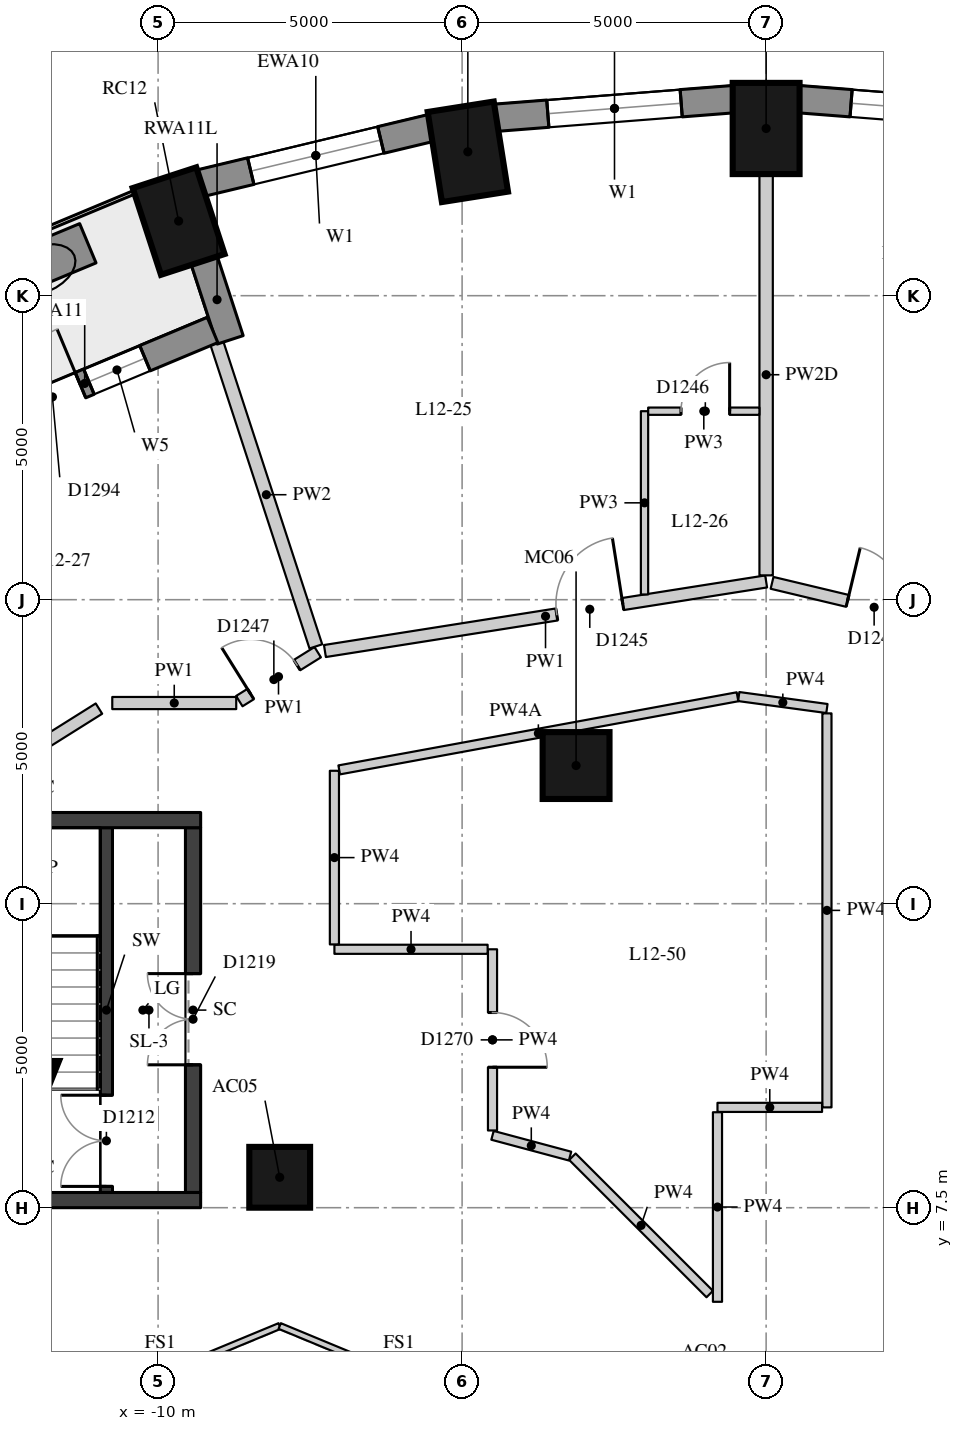
"""IFC4 building model, lengths in metres.
Left out: names, types, materials, properties, quantities, classifications, styles, units other than length and angle.
Written with IfcOpenShell. Run it as: python <this file> out.ifc"""

import sys

from ifc_helpers import new_model, si_unit, direction, frame, frame_2d, origin, origin_2d, place, context, subcontext, project, spatial, rectangle, extrude, element, fill, save


model = new_model("IFC4")
c1 = context("Model", 3, precision=1e-05, world=origin(), true_north=direction((0.0, 1.0)))
c2 = subcontext(c1, "Body", "Model", "MODEL_VIEW")
j1 = project(units=[si_unit("LENGTHUNIT", "METRE"), si_unit("PLANEANGLEUNIT", "RADIAN")], contexts=[c1])
p1 = place(None, origin())
s1 = spatial("IfcSite", under=j1, at=p1, CompositionType="ELEMENT")
p2 = place(p1, origin())
s2 = spatial("IfcBuilding", under=s1, at=p2, CompositionType="ELEMENT")
p3 = place(p2, frame((0.0, 0.0, 48.1)))
s3 = spatial("IfcBuildingStorey", under=s2, at=p3, CompositionType="ELEMENT", Elevation=48.1)
for number, where, z_axis, x_axis in (
    (1, (0.0, 25.25, 0.0), (0.0, 0.0, 1.0), (0.0, 1.0, 0.0)),
    (2, (-4.906, 24.866, 0.0), (0.0, 0.0, 1.0), (-0.156, 0.988, 0.0)),
    (3, (-9.662, 23.727, 0.0), (0.0, 0.0, 1.0), (-0.31, 0.951, 0.0)),
):
    element("IfcColumn", number, at=place(p3, frame(where, z_axis=z_axis, x_axis=x_axis)), inside=s3, PredefinedType="COLUMN", context=c2, shape_type="SweptSolid", body=[
        extrude(rectangle(XDim=1.5, YDim=1.1, at=origin_2d()), origin(), (0.0, 0.0, 1.0), 3.3),
    ])
p4 = place(p3, frame((-8.0, 8.0, 0.0), z_axis=(0.0, 0.0, 1.0), x_axis=(1.0, 0.0, 0.0)))
e4 = element("IfcColumn", 4, at=p4, inside=s3, PredefinedType="COLUMN", context=c2, shape_type="SweptSolid", body=[
    extrude(rectangle(XDim=1.0, YDim=1.0, at=origin_2d()), origin(), (0.0, 0.0, 1.0), 3.3),
])
p5 = place(p3, frame((-3.126, 14.772, 0.0), z_axis=(0.0, 0.0, 1.0), x_axis=(1.0, 0.0, 0.0)))
e5 = element("IfcColumn", 5, at=p5, inside=s3, PredefinedType="COLUMN", context=c2, shape_type="SweptSolid", body=[
    extrude(rectangle(XDim=1.1, YDim=1.1, at=origin_2d()), origin(), (0.0, 0.0, 1.0), 3.3),
])
p6 = place(p3, frame((4.457, 25.426, 0.0), z_axis=(0.0, 0.0, 1.0), x_axis=(-0.996955972145, 0.077966592873, 0.0)))
e6 = element("IfcWall", 6, at=p6, inside=s3, PredefinedType="SOLIDWALL", context=c2, shape_type="SweptSolid", body=[
    extrude(rectangle(XDim=3.939, YDim=0.45, at=frame_2d((1.97, 0.0))), origin(), (0.0, 0.0, 1.0), 3.02),
])
p7 = place(p6, frame((0.87, 0.0, 0.4)))
e7 = element("IfcOpeningElement", 7, at=p7, cuts=e6, PredefinedType="OPENING", context=c2, shape_type="SweptSolid", body=[
    extrude(rectangle(XDim=2.2, YDim=1.75, at=frame_2d((1.1, 0.875))), frame((0.0, 0.235, 0.0), z_axis=(0.0, -1.0, 0.0), x_axis=(1.0, 0.0, 0.0)), (0.0, 0.0, 1.0), 0.47),
])
p8 = place(p3, frame((-0.53, 25.733, 0.0), z_axis=(0.0, 0.0, 1.0), x_axis=(-0.996955972145, -0.077966592873, 0.0)))
e8 = element("IfcWall", 8, at=p8, inside=s3, PredefinedType="SOLIDWALL", context=c2, shape_type="SweptSolid", body=[
    extrude(rectangle(XDim=3.939, YDim=0.45, at=frame_2d((1.97, 0.0))), origin(), (0.0, 0.0, 1.0), 3.02),
])
p9 = place(p8, frame((0.87, 0.0, 0.4)))
e9 = element("IfcOpeningElement", 9, at=p9, cuts=e8, PredefinedType="OPENING", context=c2, shape_type="SweptSolid", body=[
    extrude(rectangle(XDim=2.2, YDim=1.75, at=frame_2d((1.1, 0.875))), frame((0.0, 0.235, 0.0), z_axis=(0.0, -1.0, 0.0), x_axis=(1.0, 0.0, 0.0)), (0.0, 0.0, 1.0), 0.47),
])
p10 = place(p3, frame((-5.504, 25.26, 0.0), z_axis=(0.0, 0.0, 1.0), x_axis=(-0.972496561493, -0.232917233979, 0.0)))
e10 = element("IfcWall", 10, at=p10, inside=s3, PredefinedType="SOLIDWALL", context=c2, shape_type="SweptSolid", body=[
    extrude(rectangle(XDim=3.911, YDim=0.45, at=frame_2d((1.956, 0.0))), origin(), (0.0, 0.0, 1.0), 3.02),
])
p11 = place(p10, frame((0.855, 0.0, 0.4)))
e11 = element("IfcOpeningElement", 11, at=p11, cuts=e10, PredefinedType="OPENING", context=c2, shape_type="SweptSolid", body=[
    extrude(rectangle(XDim=2.2, YDim=1.75, at=frame_2d((1.1, 0.875))), frame((0.0, 0.235, 0.0), z_axis=(0.0, -1.0, 0.0), x_axis=(1.0, 0.0, 0.0)), (0.0, 0.0, 1.0), 0.47),
])
p12 = place(p3, frame((-9.246, 23.095, 0.0), z_axis=(0.0, 0.0, 1.0), x_axis=(0.310110311429, -0.950700581017, 0.0)))
e12 = element("IfcWall", 12, at=p12, inside=s3, PredefinedType="SOLIDWALL", context=c2, shape_type="SweptSolid", body=[
    extrude(rectangle(XDim=1.39, YDim=0.45, at=frame_2d((0.695, 0.0))), origin(), (0.0, 0.0, 1.0), 3.02),
])
p13 = place(p3, frame((-9.104, 21.936, 0.0), z_axis=(0.0, 0.0, 1.0), x_axis=(-0.922645368502, -0.385649483317, 0.0)))
e13 = element("IfcWall", 13, at=p13, inside=s3, PredefinedType="SOLIDWALL", context=c2, shape_type="SweptSolid", body=[
    extrude(rectangle(XDim=4.559, YDim=0.45, at=frame_2d((2.279, 0.0))), origin(), (0.0, 0.0, 1.0), 3.02),
])
p14 = place(p13, frame((1.204, 0.0, 0.4)))
e14 = element("IfcOpeningElement", 14, at=p14, cuts=e13, PredefinedType="OPENING", context=c2, shape_type="SweptSolid", body=[
    extrude(rectangle(XDim=1.0, YDim=1.75, at=frame_2d((0.5, 0.875))), frame((0.0, 0.235, 0.0), z_axis=(0.0, -1.0, 0.0), x_axis=(1.0, 0.0, 0.0)), (0.0, 0.0, 1.0), 0.47),
])
p15 = place(p13, frame((2.354, 0.0, 0.0)))
e15 = element("IfcOpeningElement", 15, at=p15, cuts=e13, PredefinedType="OPENING", context=c2, shape_type="SweptSolid", body=[
    extrude(rectangle(XDim=1.0, YDim=2.15, at=frame_2d((0.5, 1.075))), frame((0.0, 0.235, 0.0), z_axis=(0.0, -1.0, 0.0), x_axis=(1.0, 0.0, 0.0)), (0.0, 0.0, 1.0), 0.47),
])
p16 = place(p3, frame((-11.155, 23.362, 0.0), z_axis=(0.0, 0.0, 1.0), x_axis=(-0.923000660042, -0.384798364811, 0.0)))
e16 = element("IfcWall", 16, at=p16, inside=s3, PredefinedType="USERDEFINED", context=c2, shape_type="SweptSolid", body=[
    extrude(rectangle(XDim=1.8, YDim=0.7, at=frame_2d((0.9, 0.0))), origin(), (0.0, 0.0, 1.0), 0.75),
])
p17 = place(p3, frame((-10.85, 7.75, 0.0), z_axis=(0.0, 0.0, 1.0), x_axis=(0.0, 1.0, 0.0)))
e17 = element("IfcWall", 17, at=p17, inside=s3, PredefinedType="SHEAR", context=c2, shape_type="SweptSolid", body=[
    extrude(rectangle(XDim=6.0, YDim=0.2, at=frame_2d((3.0, 0.0))), origin(), (0.0, 0.0, 1.0), 3.02),
])
p18 = place(p17, frame((0.1, 0.0, 0.0)))
e18 = element("IfcOpeningElement", 18, at=p18, cuts=e17, PredefinedType="OPENING", context=c2, shape_type="SweptSolid", body=[
    extrude(rectangle(XDim=1.5, YDim=2.1, at=frame_2d((0.75, 1.05))), frame((0.0, 0.11, 0.0), z_axis=(0.0, -1.0, 0.0), x_axis=(1.0, 0.0, 0.0)), (0.0, 0.0, 1.0), 0.22),
])
p19 = place(p3, frame((-9.425, 7.75, -0.28), z_axis=(0.0, 0.0, 1.0), x_axis=(0.0, 1.0, 0.0)))
e19 = element("IfcWall", 19, at=p19, inside=s3, PredefinedType="SHEAR", context=c2, shape_type="SweptSolid", body=[
    extrude(rectangle(XDim=6.0, YDim=0.25, at=frame_2d((3.0, 0.0))), origin(), (0.0, 0.0, 1.0), 3.3),
])
p20 = place(p19, frame((2.1, 0.0, 0.28)))
e20 = element("IfcOpeningElement", 20, at=p20, cuts=e19, PredefinedType="OPENING", context=c2, shape_type="SweptSolid", body=[
    extrude(rectangle(XDim=1.5, YDim=2.1, at=frame_2d((0.75, 1.05))), frame((0.0, 0.135, 0.0), z_axis=(0.0, -1.0, 0.0), x_axis=(1.0, 0.0, 0.0)), (0.0, 0.0, 1.0), 0.27),
])
for number, where, z_axis, x_axis in (
    (21, (-14.5, 13.875, -0.28), (0.0, 0.0, 1.0), (1.0, 0.0, 0.0)),
    (22, (-14.5, 7.625, -0.28), (0.0, 0.0, 1.0), (1.0, 0.0, 0.0)),
):
    element("IfcWall", number, at=place(p3, frame(where, z_axis=z_axis, x_axis=x_axis)), inside=s3, PredefinedType="SHEAR", context=c2, shape_type="SweptSolid", body=[
        extrude(rectangle(XDim=5.2, YDim=0.25, at=frame_2d((2.6, 0.0))), origin(), (0.0, 0.0, 1.0), 3.3),
    ])
p21 = place(p3, frame((-13.571, 14.077, 0.0), z_axis=(0.0, 0.0, 1.0), x_axis=(0.846954991261, 0.53166459613, 0.0)))
e23 = element("IfcWall", 23, at=p21, inside=s3, PredefinedType="PARTITIONING", context=c2, shape_type="SweptSolid", body=[
    extrude(rectangle(XDim=3.068, YDim=0.2, at=frame_2d((1.534, 0.0))), origin(), (0.0, 0.0, 1.0), 3.02),
])
p22 = place(p3, frame((-10.753, 15.8, 0.0), z_axis=(0.0, 0.0, 1.0), x_axis=(1.0, 0.0, 0.0)))
e24 = element("IfcWall", 24, at=p22, inside=s3, PredefinedType="PARTITIONING", context=c2, shape_type="SweptSolid", body=[
    extrude(rectangle(XDim=2.039, YDim=0.2, at=frame_2d((1.019, 0.0))), origin(), (0.0, 0.0, 1.0), 3.02),
])
p23 = place(p3, frame((-8.664, 15.832, 0.0), z_axis=(0.0, 0.0, 1.0), x_axis=(0.848304931689, 0.529508019648, 0.0)))
e25 = element("IfcWall", 25, at=p23, inside=s3, PredefinedType="PARTITIONING", context=c2, shape_type="SweptSolid", body=[
    extrude(rectangle(XDim=1.52, YDim=0.2, at=frame_2d((0.76, 0.0))), origin(), (0.0, 0.0, 1.0), 3.02),
])
p24 = place(p23, frame((0.22, 0.0, 0.0)))
e26 = element("IfcOpeningElement", 26, at=p24, cuts=e25, PredefinedType="OPENING", context=c2, shape_type="SweptSolid", body=[
    extrude(rectangle(XDim=0.9, YDim=2.1, at=frame_2d((0.45, 1.05))), frame((0.0, 0.11, 0.0), z_axis=(0.0, -1.0, 0.0), x_axis=(1.0, 0.0, 0.0)), (0.0, 0.0, 1.0), 0.22),
])
p25 = place(p3, frame((-7.256, 16.656, 0.0), z_axis=(0.0, 0.0, 1.0), x_axis=(0.987787475409, 0.15580726371, 0.0)))
e27 = element("IfcWall", 27, at=p25, inside=s3, PredefinedType="PARTITIONING", context=c2, shape_type="SweptSolid", body=[
    extrude(rectangle(XDim=7.346, YDim=0.2, at=frame_2d((3.673, 0.0))), origin(), (0.0, 0.0, 1.0), 3.02),
])
p26 = place(p25, frame((3.86, 0.0, 0.0)))
e28 = element("IfcOpeningElement", 28, at=p26, cuts=e27, PredefinedType="OPENING", context=c2, shape_type="SweptSolid", body=[
    extrude(rectangle(XDim=1.1, YDim=2.1, at=frame_2d((0.55, 1.05))), frame((0.0, 0.11, 0.0), z_axis=(0.0, -1.0, 0.0), x_axis=(1.0, 0.0, 0.0)), (0.0, 0.0, 1.0), 0.22),
])
p27 = place(p3, frame((0.098, 17.777, 0.0), z_axis=(0.0, 0.0, 1.0), x_axis=(0.97258196627, -0.232560355362, 0.0)))
e29 = element("IfcWall", 29, at=p27, inside=s3, PredefinedType="PARTITIONING", context=c2, shape_type="SweptSolid", body=[
    extrude(rectangle(XDim=10.933, YDim=0.2, at=frame_2d((5.466, 0.0))), origin(), (0.0, 0.0, 1.0), 3.02),
])
p28 = place(p27, frame((9.613, 0.0, 0.0)))
e30 = element("IfcOpeningElement", 30, at=p28, cuts=e29, PredefinedType="OPENING", context=c2, shape_type="SweptSolid", body=[
    extrude(rectangle(XDim=1.1, YDim=2.1, at=frame_2d((0.55, 1.05))), frame((0.0, 0.11, 0.0), z_axis=(0.0, -1.0, 0.0), x_axis=(1.0, 0.0, 0.0)), (0.0, 0.0, 1.0), 0.22),
])
p29 = place(p27, frame((4.325, 0.0, 0.0)))
e31 = element("IfcOpeningElement", 31, at=p29, cuts=e29, PredefinedType="OPENING", context=c2, shape_type="SweptSolid", body=[
    extrude(rectangle(XDim=1.0, YDim=2.1, at=frame_2d((0.5, 1.05))), frame((0.0, 0.11, 0.0), z_axis=(0.0, -1.0, 0.0), x_axis=(1.0, 0.0, 0.0)), (0.0, 0.0, 1.0), 0.22),
])
p30 = place(p27, frame((1.276, 0.0, 0.0)))
e32 = element("IfcOpeningElement", 32, at=p30, cuts=e29, PredefinedType="OPENING", context=c2, shape_type="SweptSolid", body=[
    extrude(rectangle(XDim=0.9, YDim=2.1, at=frame_2d((0.45, 1.05))), frame((0.0, 0.11, 0.0), z_axis=(0.0, -1.0, 0.0), x_axis=(1.0, 0.0, 0.0)), (0.0, 0.0, 1.0), 0.22),
])
p31 = place(p3, frame((-0.451, 15.907, 0.0), z_axis=(0.0, 0.0, 1.0), x_axis=(0.99094751199, -0.134249873301, 0.0)))
e33 = element("IfcWall", 33, at=p31, inside=s3, PredefinedType="PARTITIONING", context=c2, shape_type="SweptSolid", body=[
    extrude(rectangle(XDim=1.464, YDim=0.15, at=frame_2d((0.732, 0.0))), origin(), (0.0, 0.0, 1.0), 3.02),
])
p32 = place(p3, frame((1.0, 15.63, 0.0), z_axis=(0.0, 0.0, 1.0), x_axis=(0.0, -1.0, 0.0)))
e34 = element("IfcWall", 34, at=p32, inside=s3, PredefinedType="PARTITIONING", context=c2, shape_type="SweptSolid", body=[
    extrude(rectangle(XDim=6.48, YDim=0.15, at=frame_2d((3.24, 0.0))), origin(), (0.0, 0.0, 1.0), 2.47),
])
p33 = place(p3, frame((0.92, 9.15, 0.0), z_axis=(0.0, 0.0, 1.0), x_axis=(-1.0, 0.0, 0.0)))
e35 = element("IfcWall", 35, at=p33, inside=s3, PredefinedType="PARTITIONING", context=c2, shape_type="SweptSolid", body=[
    extrude(rectangle(XDim=1.72, YDim=0.15, at=frame_2d((0.86, 0.0))), origin(), (0.0, 0.0, 1.0), 3.02),
])
p34 = place(p3, frame((-0.8, 9.07, 0.0), z_axis=(0.0, 0.0, 1.0), x_axis=(0.0, -1.0, 0.0)))
e36 = element("IfcWall", 36, at=p34, inside=s3, PredefinedType="PARTITIONING", context=c2, shape_type="SweptSolid", body=[
    extrude(rectangle(XDim=3.118, YDim=0.15, at=frame_2d((1.559, 0.0))), origin(), (0.0, 0.0, 1.0), 3.02),
])
p35 = place(p3, frame((-0.927, 6.08, 0.0), z_axis=(0.0, 0.0, 1.0), x_axis=(-0.707106781187, 0.707106781187, 0.0)))
e37 = element("IfcWall", 37, at=p35, inside=s3, PredefinedType="PARTITIONING", context=c2, shape_type="SweptSolid", body=[
    extrude(rectangle(XDim=3.194, YDim=0.15, at=frame_2d((1.597, 0.0))), origin(), (0.0, 0.0, 1.0), 3.02),
])
p36 = place(p3, frame((-3.225, 8.348, 0.0), z_axis=(0.0, 0.0, 1.0), x_axis=(-0.965915035697, 0.258859312783, 0.0)))
e38 = element("IfcWall", 38, at=p36, inside=s3, PredefinedType="PARTITIONING", context=c2, shape_type="SweptSolid", body=[
    extrude(rectangle(XDim=1.32, YDim=0.15, at=frame_2d((0.66, 0.0))), origin(), (0.0, 0.0, 1.0), 3.02),
])
p37 = place(p3, frame((-4.5, 8.77, 0.0), z_axis=(0.0, 0.0, 1.0), x_axis=(0.0, 1.0, 0.0)))
e39 = element("IfcWall", 39, at=p37, inside=s3, PredefinedType="PARTITIONING", context=c2, shape_type="SweptSolid", body=[
    extrude(rectangle(XDim=2.98, YDim=0.15, at=frame_2d((1.49, 0.0))), origin(), (0.0, 0.0, 1.0), 3.02),
])
p38 = place(p37, frame((1.04, 0.0, 0.0)))
e40 = element("IfcOpeningElement", 40, at=p38, cuts=e39, PredefinedType="OPENING", context=c2, shape_type="SweptSolid", body=[
    extrude(rectangle(XDim=0.9, YDim=2.1, at=frame_2d((0.45, 1.05))), frame((0.0, 0.085, 0.0), z_axis=(0.0, -1.0, 0.0), x_axis=(1.0, 0.0, 0.0)), (0.0, 0.0, 1.0), 0.17),
])
p39 = place(p3, frame((-4.58, 11.75, 0.0), z_axis=(0.0, 0.0, 1.0), x_axis=(-1.0, 0.0, 0.0)))
e41 = element("IfcWall", 41, at=p39, inside=s3, PredefinedType="PARTITIONING", context=c2, shape_type="SweptSolid", body=[
    extrude(rectangle(XDim=2.52, YDim=0.15, at=frame_2d((1.26, 0.0))), origin(), (0.0, 0.0, 1.0), 3.02),
])
p40 = place(p3, frame((-7.1, 11.83, 0.0), z_axis=(0.0, 0.0, 1.0), x_axis=(0.0, 1.0, 0.0)))
e42 = element("IfcWall", 42, at=p40, inside=s3, PredefinedType="PARTITIONING", context=c2, shape_type="SweptSolid", body=[
    extrude(rectangle(XDim=2.856, YDim=0.15, at=frame_2d((1.428, 0.0))), origin(), (0.0, 0.0, 1.0), 3.02),
])
p41 = place(p3, frame((-7.021, 14.701, 0.0), z_axis=(0.0, 0.0, 1.0), x_axis=(0.983567630435, 0.180540068573, 0.0)))
e43 = element("IfcWall", 43, at=p41, inside=s3, PredefinedType="PARTITIONING", context=c2, shape_type="SweptSolid", body=[
    extrude(rectangle(XDim=6.66, YDim=0.15, at=frame_2d((3.33, 0.0))), origin(), (0.0, 0.0, 1.0), 2.57),
])
p42 = place(p3, frame((0.0, 24.5, 0.0), z_axis=(0.0, 0.0, 1.0), x_axis=(0.0, -1.0, 0.0)))
e44 = element("IfcWall", 44, at=p42, inside=s3, PredefinedType="PARTITIONING", context=c2, shape_type="SweptSolid", body=[
    extrude(rectangle(XDim=6.6, YDim=0.22, at=frame_2d((3.3, 0.0))), origin(), (0.0, 0.0, 1.0), 2.47),
])
p43 = place(p3, frame((-9.034, 21.721, 0.0), z_axis=(0.0, 0.0, 1.0), x_axis=(0.310304845104, -0.950637103791, 0.0)))
e45 = element("IfcWall", 45, at=p43, inside=s3, PredefinedType="PARTITIONING", context=c2, shape_type="SweptSolid", body=[
    extrude(rectangle(XDim=5.249, YDim=0.22, at=frame_2d((2.624, 0.0))), origin(), (0.0, 0.0, 1.0), 3.02),
])
p44 = place(p3, frame((-2.0, 17.586, 0.0), z_axis=(0.0, 0.0, 1.0), x_axis=(0.0, 1.0, 0.0)))
e46 = element("IfcWall", 46, at=p44, inside=s3, PredefinedType="PARTITIONING", context=c2, shape_type="SweptSolid", body=[
    extrude(rectangle(XDim=3.014, YDim=0.12, at=frame_2d((1.507, 0.0))), origin(), (0.0, 0.0, 1.0), 3.02),
])
p45 = place(p3, frame((-1.94, 20.6, 0.0), z_axis=(0.0, 0.0, 1.0), x_axis=(1.0, 0.0, 0.0)))
e47 = element("IfcWall", 47, at=p45, inside=s3, PredefinedType="PARTITIONING", context=c2, shape_type="SweptSolid", body=[
    extrude(rectangle(XDim=1.83, YDim=0.12, at=frame_2d((0.915, 0.0))), origin(), (0.0, 0.0, 1.0), 3.02),
])
p46 = place(p45, frame((0.54, 0.0, 0.0)))
e48 = element("IfcOpeningElement", 48, at=p46, cuts=e47, PredefinedType="OPENING", context=c2, shape_type="SweptSolid", body=[
    extrude(rectangle(XDim=0.8, YDim=2.1, at=frame_2d((0.4, 1.05))), frame((0.0, 0.07, 0.0), z_axis=(0.0, -1.0, 0.0), x_axis=(1.0, 0.0, 0.0)), (0.0, 0.0, 1.0), 0.14),
])
for number, where, z_axis, x_axis in (
    (49, (-11.927, 3.927, 0.0), (0.0, 0.0, 1.0), (0.924, 0.383, 0.0)),
    (50, (-8.0, 5.554, 0.0), (0.0, 0.0, 1.0), (0.924, -0.383, 0.0)),
):
    element("IfcWall", number, at=place(p3, frame(where, z_axis=z_axis, x_axis=x_axis)), inside=s3, PredefinedType="PARTITIONING", context=c2, shape_type="SweptSolid", body=[
        extrude(rectangle(XDim=4.251, YDim=0.1, at=frame_2d((2.125, 0.0))), origin(), (0.0, 0.0, 1.0), 3.02),
    ])
p47 = place(p7, origin())
e51 = element("IfcWindow", 51, at=p47, inside=s3, PartitioningType="SINGLE_PANEL", PredefinedType="WINDOW", context=c2, shape_type="SweptSolid", body=[
    extrude(rectangle(XDim=2.2, YDim=1.75, at=frame_2d((1.1, 0.875))), frame((0.0, 0.035, 0.0), z_axis=(0.0, -1.0, 0.0), x_axis=(1.0, 0.0, 0.0)), (0.0, 0.0, 1.0), 0.06),
])
fill(e7, e51)
p48 = place(p9, origin())
e52 = element("IfcWindow", 52, at=p48, inside=s3, PartitioningType="SINGLE_PANEL", PredefinedType="WINDOW", context=c2, shape_type="SweptSolid", body=[
    extrude(rectangle(XDim=2.2, YDim=1.75, at=frame_2d((1.1, 0.875))), frame((0.0, 0.035, 0.0), z_axis=(0.0, -1.0, 0.0), x_axis=(1.0, 0.0, 0.0)), (0.0, 0.0, 1.0), 0.06),
])
fill(e9, e52)
p49 = place(p11, origin())
e53 = element("IfcWindow", 53, at=p49, inside=s3, PartitioningType="SINGLE_PANEL", PredefinedType="WINDOW", context=c2, shape_type="SweptSolid", body=[
    extrude(rectangle(XDim=2.2, YDim=1.75, at=frame_2d((1.1, 0.875))), frame((0.0, 0.035, 0.0), z_axis=(0.0, -1.0, 0.0), x_axis=(1.0, 0.0, 0.0)), (0.0, 0.0, 1.0), 0.06),
])
fill(e11, e53)
p50 = place(p14, origin())
e54 = element("IfcWindow", 54, at=p50, inside=s3, PartitioningType="SINGLE_PANEL", PredefinedType="WINDOW", context=c2, shape_type="SweptSolid", body=[
    extrude(rectangle(XDim=1.0, YDim=1.75, at=frame_2d((0.5, 0.875))), frame((0.0, 0.035, 0.0), z_axis=(0.0, -1.0, 0.0), x_axis=(1.0, 0.0, 0.0)), (0.0, 0.0, 1.0), 0.06),
])
fill(e14, e54)
p51 = place(p15, frame((1.0, 0.0, 0.0), z_axis=(0.0, 0.0, 1.0), x_axis=(-1.0, 0.0, 0.0)))
e55 = element("IfcDoor", 55, at=p51, inside=s3, OperationType="SINGLE_SWING_RIGHT", PredefinedType="DOOR", context=c2, shape_type="SweptSolid", body=[
    extrude(rectangle(XDim=1.0, YDim=2.15, at=frame_2d((0.5, 1.075))), frame((0.0, 0.075, 0.0), z_axis=(0.0, -1.0, 0.0), x_axis=(1.0, 0.0, 0.0)), (0.0, 0.0, 1.0), 0.05),
])
fill(e15, e55)
p52 = place(p18, origin())
e56 = element("IfcDoor", 56, at=p52, inside=s3, OperationType="DOUBLE_DOOR_SINGLE_SWING", PredefinedType="DOOR", context=c2, shape_type="SweptSolid", body=[
    extrude(rectangle(XDim=1.5, YDim=2.1, at=frame_2d((0.75, 1.05))), frame((0.0, 0.025, 0.0), z_axis=(0.0, -1.0, 0.0), x_axis=(1.0, 0.0, 0.0)), (0.0, 0.0, 1.0), 0.05),
])
fill(e18, e56)
p53 = place(p20, origin())
e57 = element("IfcDoor", 57, at=p53, inside=s3, OperationType="DOUBLE_DOOR_SINGLE_SWING", PredefinedType="DOOR", context=c2, shape_type="SweptSolid", body=[
    extrude(rectangle(XDim=1.5, YDim=2.1, at=frame_2d((0.75, 1.05))), frame((0.0, 0.025, 0.0), z_axis=(0.0, -1.0, 0.0), x_axis=(1.0, 0.0, 0.0)), (0.0, 0.0, 1.0), 0.05),
])
fill(e20, e57)
p54 = place(p30, origin())
e58 = element("IfcDoor", 58, at=p54, inside=s3, OperationType="SINGLE_SWING_LEFT", PredefinedType="DOOR", context=c2, shape_type="SweptSolid", body=[
    extrude(rectangle(XDim=0.9, YDim=2.1, at=frame_2d((0.45, 1.05))), frame((0.0, 0.025, 0.0), z_axis=(0.0, -1.0, 0.0), x_axis=(1.0, 0.0, 0.0)), (0.0, 0.0, 1.0), 0.05),
])
fill(e32, e58)
p55 = place(p26, origin())
e59 = element("IfcDoor", 59, at=p55, inside=s3, OperationType="SINGLE_SWING_RIGHT", PredefinedType="DOOR", context=c2, shape_type="SweptSolid", body=[
    extrude(rectangle(XDim=1.1, YDim=2.1, at=frame_2d((0.55, 1.05))), frame((0.0, 0.025, 0.0), z_axis=(0.0, -1.0, 0.0), x_axis=(1.0, 0.0, 0.0)), (0.0, 0.0, 1.0), 0.05),
])
fill(e28, e59)
p56 = place(p46, origin())
e60 = element("IfcDoor", 60, at=p56, inside=s3, OperationType="SINGLE_SWING_RIGHT", PredefinedType="DOOR", context=c2, shape_type="SweptSolid", body=[
    extrude(rectangle(XDim=0.8, YDim=2.1, at=frame_2d((0.4, 1.05))), frame((0.0, 0.025, 0.0), z_axis=(0.0, -1.0, 0.0), x_axis=(1.0, 0.0, 0.0)), (0.0, 0.0, 1.0), 0.05),
])
fill(e48, e60)
p57 = place(p24, origin())
e61 = element("IfcDoor", 61, at=p57, inside=s3, OperationType="SINGLE_SWING_LEFT", PredefinedType="DOOR", context=c2, shape_type="SweptSolid", body=[
    extrude(rectangle(XDim=0.9, YDim=2.1, at=frame_2d((0.45, 1.05))), frame((0.0, 0.025, 0.0), z_axis=(0.0, -1.0, 0.0), x_axis=(1.0, 0.0, 0.0)), (0.0, 0.0, 1.0), 0.05),
])
fill(e26, e61)
p58 = place(p38, origin())
e62 = element("IfcDoor", 62, at=p58, inside=s3, OperationType="SINGLE_SWING_RIGHT", PredefinedType="DOOR", context=c2, shape_type="SweptSolid", body=[
    extrude(rectangle(XDim=0.9, YDim=2.1, at=frame_2d((0.45, 1.05))), frame((0.0, 0.025, 0.0), z_axis=(0.0, -1.0, 0.0), x_axis=(1.0, 0.0, 0.0)), (0.0, 0.0, 1.0), 0.05),
])
fill(e40, e62)
save(model, sys.argv[1])
